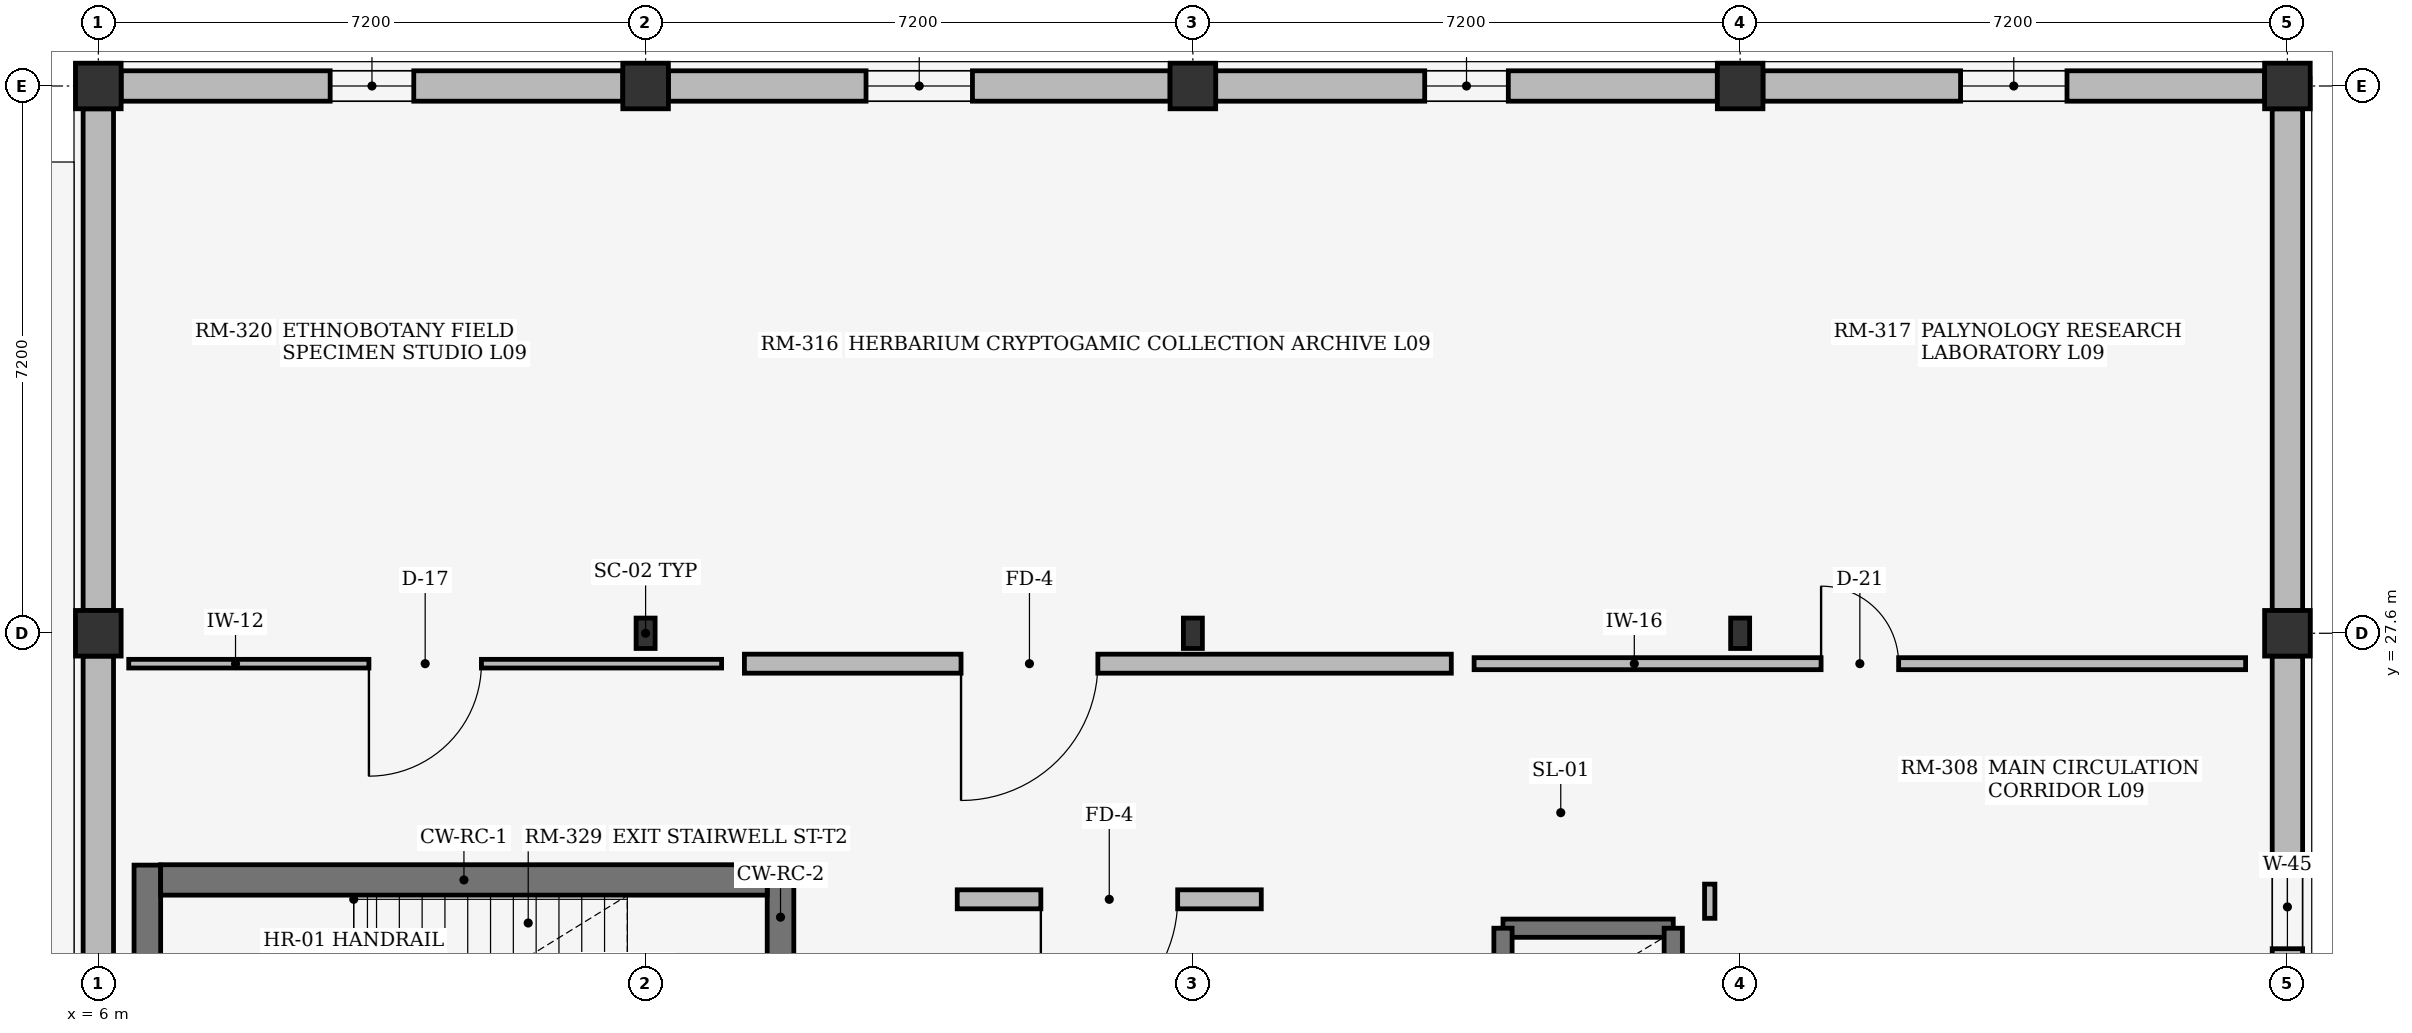
"""IFC4 building model, lengths in metres.
Left out: names, types, materials, properties, quantities, classifications, styles, units other than length and angle.
Written with IfcOpenShell. Run it as: python <this file> out.ifc"""

import sys

from ifc_helpers import new_model, si_unit, direction, frame, frame_2d, origin, origin_2d, place, context, subcontext, project, spatial, rectangle, i_section, extrude, element, fill, save


model = new_model("IFC4")
c1 = context("Model", 3, precision=1e-05, world=origin(), true_north=direction((0.0, 1.0)))
c2 = subcontext(c1, "Body", "Model", "MODEL_VIEW")
j1 = project(units=[si_unit("LENGTHUNIT", "METRE"), si_unit("PLANEANGLEUNIT", "RADIAN")], contexts=[c1])
p1 = place(None, origin())
s1 = spatial("IfcSite", under=j1, at=p1, CompositionType="ELEMENT")
p2 = place(p1, origin())
s2 = spatial("IfcBuilding", under=s1, at=p2, CompositionType="ELEMENT")
p3 = place(p2, frame((0.0, 0.0, 36.6)))
s3 = spatial("IfcBuildingStorey", under=s2, at=p3, CompositionType="ELEMENT", Elevation=36.6)
for number, where, z_axis, x_axis in (
    (1, (6.0, 27.6, 0.0), (0.0, 0.0, 1.0), (1.0, 0.0, 0.0)),
    (2, (6.0, 34.8, 0.0), (0.0, 0.0, 1.0), (1.0, 0.0, 0.0)),
):
    element("IfcColumn", number, at=place(p3, frame(where, z_axis=z_axis, x_axis=x_axis)), inside=s3, PredefinedType="COLUMN", context=c2, shape_type="SweptSolid", body=[
        extrude(rectangle(XDim=0.6, YDim=0.6, at=origin_2d()), origin(), (0.0, 0.0, 1.0), 3.62),
    ])
p4 = place(p3, frame((13.2, 27.6, 0.0), z_axis=(0.0, 0.0, 1.0), x_axis=(1.0, 0.0, 0.0)))
e3 = element("IfcColumn", 3, at=p4, inside=s3, PredefinedType="COLUMN", context=c2, shape_type="SweptSolid", body=[
    extrude(i_section(OverallWidth=0.25, OverallDepth=0.4, WebThickness=0.01, FlangeThickness=0.013, at=origin_2d()), origin(), (0.0, 0.0, 1.0), 3.62),
])
p5 = place(p3, frame((13.2, 34.8, 0.0), z_axis=(0.0, 0.0, 1.0), x_axis=(1.0, 0.0, 0.0)))
e4 = element("IfcColumn", 4, at=p5, inside=s3, PredefinedType="COLUMN", context=c2, shape_type="SweptSolid", body=[
    extrude(rectangle(XDim=0.6, YDim=0.6, at=origin_2d()), origin(), (0.0, 0.0, 1.0), 3.62),
])
p6 = place(p3, frame((20.4, 27.6, 0.0), z_axis=(0.0, 0.0, 1.0), x_axis=(1.0, 0.0, 0.0)))
e5 = element("IfcColumn", 5, at=p6, inside=s3, PredefinedType="COLUMN", context=c2, shape_type="SweptSolid", body=[
    extrude(i_section(OverallWidth=0.25, OverallDepth=0.4, WebThickness=0.01, FlangeThickness=0.013, at=origin_2d()), origin(), (0.0, 0.0, 1.0), 3.62),
])
p7 = place(p3, frame((20.4, 34.8, 0.0), z_axis=(0.0, 0.0, 1.0), x_axis=(1.0, 0.0, 0.0)))
e6 = element("IfcColumn", 6, at=p7, inside=s3, PredefinedType="COLUMN", context=c2, shape_type="SweptSolid", body=[
    extrude(rectangle(XDim=0.6, YDim=0.6, at=origin_2d()), origin(), (0.0, 0.0, 1.0), 3.62),
])
p8 = place(p3, frame((27.6, 27.6, 0.0), z_axis=(0.0, 0.0, 1.0), x_axis=(1.0, 0.0, 0.0)))
e7 = element("IfcColumn", 7, at=p8, inside=s3, PredefinedType="COLUMN", context=c2, shape_type="SweptSolid", body=[
    extrude(i_section(OverallWidth=0.25, OverallDepth=0.4, WebThickness=0.01, FlangeThickness=0.013, at=origin_2d()), origin(), (0.0, 0.0, 1.0), 3.62),
])
for number, where, z_axis, x_axis in (
    (8, (27.6, 34.8, 0.0), (0.0, 0.0, 1.0), (1.0, 0.0, 0.0)),
    (9, (34.8, 27.6, 0.0), (0.0, 0.0, 1.0), (1.0, 0.0, 0.0)),
    (10, (34.8, 34.8, 0.0), (0.0, 0.0, 1.0), (1.0, 0.0, 0.0)),
):
    element("IfcColumn", number, at=place(p3, frame(where, z_axis=z_axis, x_axis=x_axis)), inside=s3, PredefinedType="COLUMN", context=c2, shape_type="SweptSolid", body=[
        extrude(rectangle(XDim=0.6, YDim=0.6, at=origin_2d()), origin(), (0.0, 0.0, 1.0), 3.62),
    ])
p9 = place(p3, frame((6.3, 34.8, 0.0), z_axis=(0.0, 0.0, 1.0), x_axis=(1.0, 0.0, 0.0)))
e11 = element("IfcWall", 11, at=p9, inside=s3, PredefinedType="STANDARD", context=c2, shape_type="SweptSolid", body=[
    extrude(rectangle(XDim=6.6, YDim=0.4, at=frame_2d((3.3, 0.0))), origin(), (0.0, 0.0, 1.0), 3.1),
])
p10 = place(p9, frame((2.75, 0.0, 0.75)))
e12 = element("IfcOpeningElement", 12, at=p10, cuts=e11, PredefinedType="OPENING", context=c2, shape_type="SweptSolid", body=[
    extrude(rectangle(XDim=1.1, YDim=1.25, at=frame_2d((0.55, 0.625))), frame((0.0, 0.21, 0.0), z_axis=(0.0, -1.0, 0.0), x_axis=(1.0, 0.0, 0.0)), (0.0, 0.0, 1.0), 0.42),
])
p11 = place(p3, frame((13.5, 34.8, 0.0), z_axis=(0.0, 0.0, 1.0), x_axis=(1.0, 0.0, 0.0)))
e13 = element("IfcWall", 13, at=p11, inside=s3, PredefinedType="STANDARD", context=c2, shape_type="SweptSolid", body=[
    extrude(rectangle(XDim=6.6, YDim=0.4, at=frame_2d((3.3, 0.0))), origin(), (0.0, 0.0, 1.0), 3.1),
])
p12 = place(p11, frame((2.6, 0.0, 0.75)))
e14 = element("IfcOpeningElement", 14, at=p12, cuts=e13, PredefinedType="OPENING", context=c2, shape_type="SweptSolid", body=[
    extrude(rectangle(XDim=1.4, YDim=1.25, at=frame_2d((0.7, 0.625))), frame((0.0, 0.21, 0.0), z_axis=(0.0, -1.0, 0.0), x_axis=(1.0, 0.0, 0.0)), (0.0, 0.0, 1.0), 0.42),
])
p13 = place(p3, frame((20.7, 34.8, 0.0), z_axis=(0.0, 0.0, 1.0), x_axis=(1.0, 0.0, 0.0)))
e15 = element("IfcWall", 15, at=p13, inside=s3, PredefinedType="STANDARD", context=c2, shape_type="SweptSolid", body=[
    extrude(rectangle(XDim=6.6, YDim=0.4, at=frame_2d((3.3, 0.0))), origin(), (0.0, 0.0, 1.0), 3.1),
])
p14 = place(p13, frame((2.75, 0.0, 0.75)))
e16 = element("IfcOpeningElement", 16, at=p14, cuts=e15, PredefinedType="OPENING", context=c2, shape_type="SweptSolid", body=[
    extrude(rectangle(XDim=1.1, YDim=1.25, at=frame_2d((0.55, 0.625))), frame((0.0, 0.21, 0.0), z_axis=(0.0, -1.0, 0.0), x_axis=(1.0, 0.0, 0.0)), (0.0, 0.0, 1.0), 0.42),
])
p15 = place(p3, frame((27.9, 34.8, 0.0), z_axis=(0.0, 0.0, 1.0), x_axis=(1.0, 0.0, 0.0)))
e17 = element("IfcWall", 17, at=p15, inside=s3, PredefinedType="STANDARD", context=c2, shape_type="SweptSolid", body=[
    extrude(rectangle(XDim=6.6, YDim=0.4, at=frame_2d((3.3, 0.0))), origin(), (0.0, 0.0, 1.0), 3.1),
])
p16 = place(p15, frame((2.6, 0.0, 0.75)))
e18 = element("IfcOpeningElement", 18, at=p16, cuts=e17, PredefinedType="OPENING", context=c2, shape_type="SweptSolid", body=[
    extrude(rectangle(XDim=1.4, YDim=1.25, at=frame_2d((0.7, 0.625))), frame((0.0, 0.21, 0.0), z_axis=(0.0, -1.0, 0.0), x_axis=(1.0, 0.0, 0.0)), (0.0, 0.0, 1.0), 0.42),
])
for number, where, z_axis, x_axis in (
    (19, (6.0, 20.7, 0.0), (0.0, 0.0, 1.0), (0.0, 1.0, 0.0)),
    (20, (6.0, 27.9, 0.0), (0.0, 0.0, 1.0), (0.0, 1.0, 0.0)),
):
    element("IfcWall", number, at=place(p3, frame(where, z_axis=z_axis, x_axis=x_axis)), inside=s3, PredefinedType="STANDARD", context=c2, shape_type="SweptSolid", body=[
        extrude(rectangle(XDim=6.6, YDim=0.4, at=frame_2d((3.3, 0.0))), origin(), (0.0, 0.0, 1.0), 3.1),
    ])
p17 = place(p3, frame((34.8, 20.7, 0.0), z_axis=(0.0, 0.0, 1.0), x_axis=(0.0, 1.0, 0.0)))
e21 = element("IfcWall", 21, at=p17, inside=s3, PredefinedType="STANDARD", context=c2, shape_type="SweptSolid", body=[
    extrude(rectangle(XDim=6.6, YDim=0.4, at=frame_2d((3.3, 0.0))), origin(), (0.0, 0.0, 1.0), 3.1),
])
p18 = place(p17, frame((2.75, 0.0, 0.75)))
e22 = element("IfcOpeningElement", 22, at=p18, cuts=e21, PredefinedType="OPENING", context=c2, shape_type="SweptSolid", body=[
    extrude(rectangle(XDim=1.1, YDim=1.25, at=frame_2d((0.55, 0.625))), frame((0.0, 0.21, 0.0), z_axis=(0.0, -1.0, 0.0), x_axis=(1.0, 0.0, 0.0)), (0.0, 0.0, 1.0), 0.42),
])
p19 = place(p3, frame((34.8, 27.9, 0.0), z_axis=(0.0, 0.0, 1.0), x_axis=(0.0, 1.0, 0.0)))
e23 = element("IfcWall", 23, at=p19, inside=s3, PredefinedType="STANDARD", context=c2, shape_type="SweptSolid", body=[
    extrude(rectangle(XDim=6.6, YDim=0.4, at=frame_2d((3.3, 0.0))), origin(), (0.0, 0.0, 1.0), 3.1),
])
p20 = place(p3, frame((14.975, 24.55, 0.0), z_axis=(0.0, 0.0, 1.0), x_axis=(0.0, -1.0, 0.0)))
e24 = element("IfcWall", 24, at=p20, inside=s3, PredefinedType="SHEAR", context=c2, shape_type="SweptSolid", body=[
    extrude(rectangle(XDim=4.59, YDim=0.35, at=frame_2d((2.295, 0.0))), origin(), (0.0, 0.0, 1.0), 3.62),
])
p21 = place(p20, frame((1.72, 0.0, 0.0)))
e25 = element("IfcOpeningElement", 25, at=p21, cuts=e24, PredefinedType="OPENING", context=c2, shape_type="SweptSolid", body=[
    extrude(rectangle(XDim=1.15, YDim=2.2, at=frame_2d((0.575, 1.1))), frame((0.0, 0.185, 0.0), z_axis=(0.0, -1.0, 0.0), x_axis=(1.0, 0.0, 0.0)), (0.0, 0.0, 1.0), 0.37),
])
p22 = place(p3, frame((6.645, 24.55, 0.0), z_axis=(0.0, 0.0, 1.0), x_axis=(0.0, -1.0, 0.0)))
e26 = element("IfcWall", 26, at=p22, inside=s3, PredefinedType="SHEAR", context=c2, shape_type="SweptSolid", body=[
    extrude(rectangle(XDim=4.59, YDim=0.35, at=frame_2d((2.295, 0.0))), origin(), (0.0, 0.0, 1.0), 3.62),
])
p23 = place(p3, frame((14.8, 24.355, 0.0), z_axis=(0.0, 0.0, 1.0), x_axis=(-1.0, 0.0, 0.0)))
e27 = element("IfcWall", 27, at=p23, inside=s3, PredefinedType="SHEAR", context=c2, shape_type="SweptSolid", body=[
    extrude(rectangle(XDim=7.98, YDim=0.4, at=frame_2d((3.99, 0.0))), origin(), (0.0, 0.0, 1.0), 3.62),
])
p24 = place(p3, frame((24.48, 23.72, 0.0), z_axis=(0.0, 0.0, 1.0), x_axis=(1.0, 0.0, 0.0)))
e28 = element("IfcWall", 28, at=p24, inside=s3, PredefinedType="SHEAR", context=c2, shape_type="SweptSolid", body=[
    extrude(rectangle(XDim=2.24, YDim=0.24, at=frame_2d((1.12, 0.0))), origin(), (0.0, 0.0, 1.0), 3.62),
])
for number, where, z_axis, x_axis in (
    (29, (24.48, 20.78, 0.0), (0.0, 0.0, 1.0), (0.0, 1.0, 0.0)),
    (30, (26.72, 20.78, 0.0), (0.0, 0.0, 1.0), (0.0, 1.0, 0.0)),
):
    element("IfcWall", number, at=place(p3, frame(where, z_axis=z_axis, x_axis=x_axis)), inside=s3, PredefinedType="SHEAR", context=c2, shape_type="SweptSolid", body=[
        extrude(rectangle(XDim=2.94, YDim=0.24, at=frame_2d((1.47, 0.0))), origin(), (0.0, 0.0, 1.0), 3.62),
    ])
p25 = place(p3, frame((17.3, 24.1, 0.0), z_axis=(0.0, 0.0, 1.0), x_axis=(1.0, 0.0, 0.0)))
e31 = element("IfcWall", 31, at=p25, inside=s3, PredefinedType="SOLIDWALL", context=c2, shape_type="SweptSolid", body=[
    extrude(rectangle(XDim=4.0, YDim=0.25, at=frame_2d((2.0, 0.0))), origin(), (0.0, 0.0, 1.0), 3.6),
])
p26 = place(p25, frame((1.1, 0.0, 0.0)))
e32 = element("IfcOpeningElement", 32, at=p26, cuts=e31, PredefinedType="OPENING", context=c2, shape_type="SweptSolid", body=[
    extrude(rectangle(XDim=1.8, YDim=2.25, at=frame_2d((0.9, 1.125))), frame((0.0, 0.135, 0.0), z_axis=(0.0, -1.0, 0.0), x_axis=(1.0, 0.0, 0.0)), (0.0, 0.0, 1.0), 0.27),
])
p27 = place(p3, frame((6.4, 27.2, 0.0), z_axis=(0.0, 0.0, 1.0), x_axis=(1.0, 0.0, 0.0)))
e33 = element("IfcWall", 33, at=p27, inside=s3, PredefinedType="PARTITIONING", context=c2, shape_type="SweptSolid", body=[
    extrude(rectangle(XDim=7.8, YDim=0.114, at=frame_2d((3.9, 0.0))), origin(), (0.0, 0.0, 1.0), 3.6),
])
p28 = place(p27, frame((3.16, 0.0, 0.0)))
e34 = element("IfcOpeningElement", 34, at=p28, cuts=e33, PredefinedType="OPENING", context=c2, shape_type="SweptSolid", body=[
    extrude(rectangle(XDim=1.48, YDim=2.2, at=frame_2d((0.74, 1.1))), frame((0.0, 0.067, 0.0), z_axis=(0.0, -1.0, 0.0), x_axis=(1.0, 0.0, 0.0)), (0.0, 0.0, 1.0), 0.134),
])
p29 = place(p3, frame((27.2, 24.3, 0.0), z_axis=(0.0, 0.0, 1.0), x_axis=(0.0, -1.0, 0.0)))
e35 = element("IfcWall", 35, at=p29, inside=s3, PredefinedType="PARTITIONING", context=c2, shape_type="SweptSolid", body=[
    extrude(rectangle(XDim=0.45, YDim=0.136, at=frame_2d((0.225, 0.0))), origin(), (0.0, 0.0, 1.0), 3.6),
])
p30 = place(p3, frame((14.5, 27.2, 0.0), z_axis=(0.0, 0.0, 1.0), x_axis=(1.0, 0.0, 0.0)))
e36 = element("IfcWall", 36, at=p30, inside=s3, PredefinedType="SOLIDWALL", context=c2, shape_type="SweptSolid", body=[
    extrude(rectangle(XDim=9.3, YDim=0.25, at=frame_2d((4.65, 0.0))), origin(), (0.0, 0.0, 1.0), 3.6),
])
p31 = place(p30, frame((2.85, 0.0, 0.0)))
e37 = element("IfcOpeningElement", 37, at=p31, cuts=e36, PredefinedType="OPENING", context=c2, shape_type="SweptSolid", body=[
    extrude(rectangle(XDim=1.8, YDim=2.25, at=frame_2d((0.9, 1.125))), frame((0.0, 0.135, 0.0), z_axis=(0.0, -1.0, 0.0), x_axis=(1.0, 0.0, 0.0)), (0.0, 0.0, 1.0), 0.27),
])
p32 = place(p3, frame((24.1, 27.2, 0.0), z_axis=(0.0, 0.0, 1.0), x_axis=(1.0, 0.0, 0.0)))
e38 = element("IfcWall", 38, at=p32, inside=s3, PredefinedType="PARTITIONING", context=c2, shape_type="SweptSolid", body=[
    extrude(rectangle(XDim=10.15, YDim=0.158, at=frame_2d((5.075, 0.0))), origin(), (0.0, 0.0, 1.0), 3.6),
])
p33 = place(p32, frame((4.565, 0.0, 0.0)))
e39 = element("IfcOpeningElement", 39, at=p33, cuts=e38, PredefinedType="OPENING", context=c2, shape_type="SweptSolid", body=[
    extrude(rectangle(XDim=1.02, YDim=2.18, at=frame_2d((0.51, 1.09))), frame((0.0, 0.089, 0.0), z_axis=(0.0, -1.0, 0.0), x_axis=(1.0, 0.0, 0.0)), (0.0, 0.0, 1.0), 0.178),
])
p34 = place(p10, origin())
e40 = element("IfcWindow", 40, at=p34, inside=s3, PartitioningType="SINGLE_PANEL", PredefinedType="WINDOW", context=c2, shape_type="SweptSolid", body=[
    extrude(rectangle(XDim=1.1, YDim=1.25, at=frame_2d((0.55, 0.625))), frame((0.0, 0.03, 0.0), z_axis=(0.0, -1.0, 0.0), x_axis=(1.0, 0.0, 0.0)), (0.0, 0.0, 1.0), 0.06),
])
fill(e12, e40)
p35 = place(p12, origin())
e41 = element("IfcWindow", 41, at=p35, inside=s3, PartitioningType="SINGLE_PANEL", PredefinedType="WINDOW", context=c2, shape_type="SweptSolid", body=[
    extrude(rectangle(XDim=1.4, YDim=1.25, at=frame_2d((0.7, 0.625))), frame((0.0, 0.03, 0.0), z_axis=(0.0, -1.0, 0.0), x_axis=(1.0, 0.0, 0.0)), (0.0, 0.0, 1.0), 0.06),
])
fill(e14, e41)
p36 = place(p14, origin())
e42 = element("IfcWindow", 42, at=p36, inside=s3, PartitioningType="SINGLE_PANEL", PredefinedType="WINDOW", context=c2, shape_type="SweptSolid", body=[
    extrude(rectangle(XDim=1.1, YDim=1.25, at=frame_2d((0.55, 0.625))), frame((0.0, 0.03, 0.0), z_axis=(0.0, -1.0, 0.0), x_axis=(1.0, 0.0, 0.0)), (0.0, 0.0, 1.0), 0.06),
])
fill(e16, e42)
p37 = place(p16, origin())
e43 = element("IfcWindow", 43, at=p37, inside=s3, PartitioningType="SINGLE_PANEL", PredefinedType="WINDOW", context=c2, shape_type="SweptSolid", body=[
    extrude(rectangle(XDim=1.4, YDim=1.25, at=frame_2d((0.7, 0.625))), frame((0.0, 0.03, 0.0), z_axis=(0.0, -1.0, 0.0), x_axis=(1.0, 0.0, 0.0)), (0.0, 0.0, 1.0), 0.06),
])
fill(e18, e43)
p38 = place(p18, origin())
e44 = element("IfcWindow", 44, at=p38, inside=s3, PartitioningType="SINGLE_PANEL", PredefinedType="WINDOW", context=c2, shape_type="SweptSolid", body=[
    extrude(rectangle(XDim=1.1, YDim=1.25, at=frame_2d((0.55, 0.625))), frame((0.0, 0.03, 0.0), z_axis=(0.0, -1.0, 0.0), x_axis=(1.0, 0.0, 0.0)), (0.0, 0.0, 1.0), 0.06),
])
fill(e22, e44)
p39 = place(p26, frame((1.8, 0.0, 0.0), z_axis=(0.0, 0.0, 1.0), x_axis=(-1.0, 0.0, 0.0)))
e45 = element("IfcDoor", 45, at=p39, inside=s3, OperationType="DOUBLE_DOOR_SINGLE_SWING", PredefinedType="DOOR", context=c2, shape_type="SweptSolid", body=[
    extrude(rectangle(XDim=1.8, YDim=2.25, at=frame_2d((0.9, 1.125))), frame((0.0, 0.025, 0.0), z_axis=(0.0, -1.0, 0.0), x_axis=(1.0, 0.0, 0.0)), (0.0, 0.0, 1.0), 0.05),
])
fill(e32, e45)
p40 = place(p28, frame((1.48, 0.0, 0.0), z_axis=(0.0, 0.0, 1.0), x_axis=(-1.0, 0.0, 0.0)))
e46 = element("IfcDoor", 46, at=p40, inside=s3, OperationType="SINGLE_SWING_LEFT", PredefinedType="DOOR", context=c2, shape_type="SweptSolid", body=[
    extrude(rectangle(XDim=1.48, YDim=2.2, at=frame_2d((0.74, 1.1))), frame((0.0, 0.025, 0.0), z_axis=(0.0, -1.0, 0.0), x_axis=(1.0, 0.0, 0.0)), (0.0, 0.0, 1.0), 0.05),
])
fill(e34, e46)
p41 = place(p31, frame((1.8, 0.0, 0.0), z_axis=(0.0, 0.0, 1.0), x_axis=(-1.0, 0.0, 0.0)))
e47 = element("IfcDoor", 47, at=p41, inside=s3, OperationType="DOUBLE_DOOR_SINGLE_SWING", PredefinedType="DOOR", context=c2, shape_type="SweptSolid", body=[
    extrude(rectangle(XDim=1.8, YDim=2.25, at=frame_2d((0.9, 1.125))), frame((0.0, 0.025, 0.0), z_axis=(0.0, -1.0, 0.0), x_axis=(1.0, 0.0, 0.0)), (0.0, 0.0, 1.0), 0.05),
])
fill(e37, e47)
p42 = place(p33, origin())
e48 = element("IfcDoor", 48, at=p42, inside=s3, OperationType="SINGLE_SWING_LEFT", PredefinedType="DOOR", context=c2, shape_type="SweptSolid", body=[
    extrude(rectangle(XDim=1.02, YDim=2.18, at=frame_2d((0.51, 1.09))), frame((0.0, 0.025, 0.0), z_axis=(0.0, -1.0, 0.0), x_axis=(1.0, 0.0, 0.0)), (0.0, 0.0, 1.0), 0.05),
])
fill(e39, e48)
save(model, sys.argv[1])
